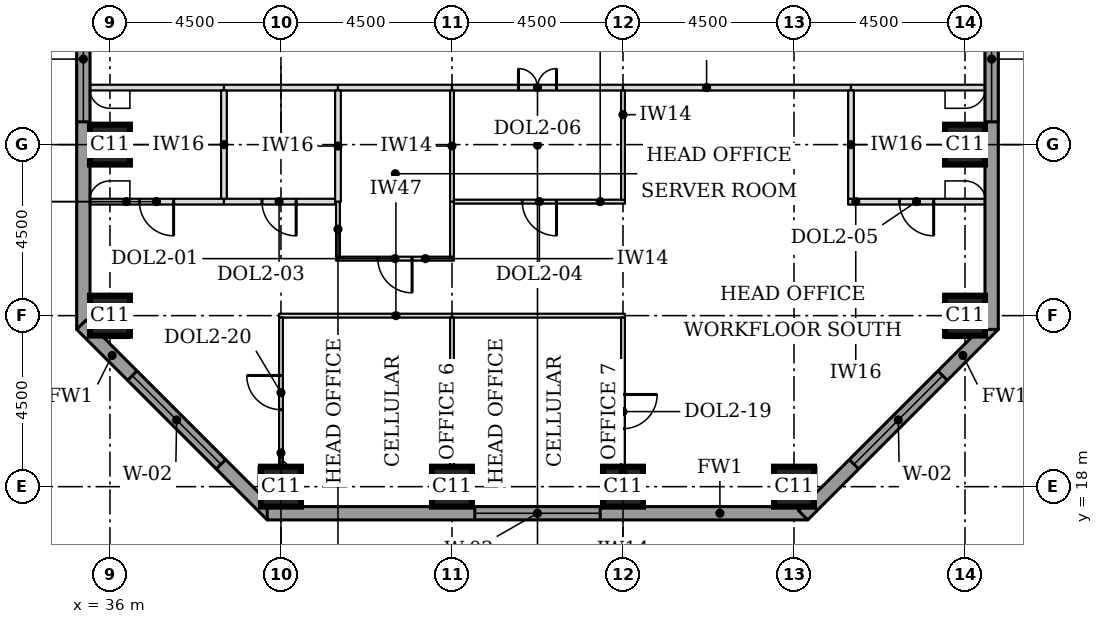
"""IFC4 building model, lengths in metres.
Left out: names, types, materials, properties, quantities, classifications, styles, units other than length and angle.
Written with IfcOpenShell. Run it as: python <this file> out.ifc"""

import sys

from ifc_helpers import new_model, si_unit, direction, frame, frame_2d, origin, origin_2d, place, context, subcontext, project, spatial, rectangle, extrude, element, fill, save


model = new_model("IFC4")
c1 = context("Model", 3, precision=1e-05, world=origin(), true_north=direction((0.0, 1.0)))
c2 = subcontext(c1, "Body", "Model", "MODEL_VIEW")
j1 = project(units=[si_unit("LENGTHUNIT", "METRE"), si_unit("PLANEANGLEUNIT", "RADIAN")], contexts=[c1])
p1 = place(None, origin())
s1 = spatial("IfcSite", under=j1, at=p1, CompositionType="ELEMENT")
p2 = place(p1, origin())
s2 = spatial("IfcBuilding", under=s1, at=p2, CompositionType="ELEMENT")
p3 = place(p2, frame((0.0, 0.0, 86.3)))
s3 = spatial("IfcBuildingStorey", under=s2, at=p3, CompositionType="ELEMENT", Elevation=86.3)
for number, where, z_axis, x_axis in (
    (1, (40.5, 18.0, 0.0), (0.0, 0.0, 1.0), (1.0, 0.0, 0.0)),
    (2, (45.0, 18.0, 0.0), (0.0, 0.0, 1.0), (1.0, 0.0, 0.0)),
    (3, (49.5, 18.0, 0.0), (0.0, 0.0, 1.0), (1.0, 0.0, 0.0)),
    (4, (54.0, 18.0, 0.0), (0.0, 0.0, 1.0), (1.0, 0.0, 0.0)),
    (5, (36.0, 22.5, 0.0), (0.0, 0.0, 1.0), (1.0, 0.0, 0.0)),
    (6, (58.5, 22.5, 0.0), (0.0, 0.0, 1.0), (1.0, 0.0, 0.0)),
    (7, (36.0, 27.0, 0.0), (0.0, 0.0, 1.0), (1.0, 0.0, 0.0)),
    (8, (58.5, 27.0, 0.0), (0.0, 0.0, 1.0), (1.0, 0.0, 0.0)),
):
    element("IfcColumn", number, at=place(p3, frame(where, z_axis=z_axis, x_axis=x_axis)), inside=s3, PredefinedType="COLUMN", context=c2, shape_type="SweptSolid", body=[
        extrude(rectangle(XDim=1.05, YDim=1.05, at=origin_2d()), origin(), (0.0, 0.0, 1.0), 3.7),
    ])
p4 = place(p3, frame((35.3, 39.975, 0.0), z_axis=(0.0, 0.0, 1.0), x_axis=(0.0, -1.0, 0.0)))
e9 = element("IfcWall", 9, at=p4, inside=s3, PredefinedType="STANDARD", context=c2, shape_type="SweptSolid", body=[
    extrude(rectangle(XDim=17.837, YDim=0.35, at=frame_2d((8.919, 0.0))), origin(), (0.0, 0.0, 1.0), 3.525),
])
p5 = place(p4, frame((0.5, 0.0, 0.9)))
e10 = element("IfcOpeningElement", 10, at=p5, cuts=e9, PredefinedType="OPENING", context=c2, shape_type="SweptSolid", body=[
    extrude(rectangle(XDim=3.3, YDim=1.9, at=frame_2d((1.65, 0.95))), frame((0.0, 0.185, 0.0), z_axis=(0.0, -1.0, 0.0), x_axis=(1.0, 0.0, 0.0)), (0.0, 0.0, 1.0), 0.37),
])
p6 = place(p4, frame((9.075, 0.0, 0.9)))
e11 = element("IfcOpeningElement", 11, at=p6, cuts=e9, PredefinedType="OPENING", context=c2, shape_type="SweptSolid", body=[
    extrude(rectangle(XDim=3.3, YDim=1.9, at=frame_2d((1.65, 0.95))), frame((0.0, 0.185, 0.0), z_axis=(0.0, -1.0, 0.0), x_axis=(1.0, 0.0, 0.0)), (0.0, 0.0, 1.0), 0.37),
])
p7 = place(p3, frame((35.249, 22.261, 0.0), z_axis=(0.0, 0.0, 1.0), x_axis=(0.707106781187, -0.707106781187, 0.0)))
e12 = element("IfcWall", 12, at=p7, inside=s3, PredefinedType="STANDARD", context=c2, shape_type="SweptSolid", body=[
    extrude(rectangle(XDim=7.089, YDim=0.35, at=frame_2d((3.544, 0.0))), origin(), (0.0, 0.0, 1.0), 3.525),
])
p8 = place(p7, frame((1.894, 0.0, 0.9)))
e13 = element("IfcOpeningElement", 13, at=p8, cuts=e12, PredefinedType="OPENING", context=c2, shape_type="SweptSolid", body=[
    extrude(rectangle(XDim=3.3, YDim=1.9, at=frame_2d((1.65, 0.95))), frame((0.0, 0.185, 0.0), z_axis=(0.0, -1.0, 0.0), x_axis=(1.0, 0.0, 0.0)), (0.0, 0.0, 1.0), 0.37),
])
p9 = place(p3, frame((40.138, 17.3, 0.0), z_axis=(0.0, 0.0, 1.0), x_axis=(1.0, 0.0, 0.0)))
e14 = element("IfcWall", 14, at=p9, inside=s3, PredefinedType="STANDARD", context=c2, shape_type="SweptSolid", body=[
    extrude(rectangle(XDim=14.225, YDim=0.35, at=frame_2d((7.112, 0.0))), origin(), (0.0, 0.0, 1.0), 3.525),
])
p10 = place(p9, frame((5.462, 0.0, 0.9)))
e15 = element("IfcOpeningElement", 15, at=p10, cuts=e14, PredefinedType="OPENING", context=c2, shape_type="SweptSolid", body=[
    extrude(rectangle(XDim=3.3, YDim=1.9, at=frame_2d((1.65, 0.95))), frame((0.0, 0.185, 0.0), z_axis=(0.0, -1.0, 0.0), x_axis=(1.0, 0.0, 0.0)), (0.0, 0.0, 1.0), 0.37),
])
p11 = place(p3, frame((54.239, 17.249, 0.0), z_axis=(0.0, 0.0, 1.0), x_axis=(0.707106781187, 0.707106781187, 0.0)))
e16 = element("IfcWall", 16, at=p11, inside=s3, PredefinedType="STANDARD", context=c2, shape_type="SweptSolid", body=[
    extrude(rectangle(XDim=7.089, YDim=0.35, at=frame_2d((3.544, 0.0))), origin(), (0.0, 0.0, 1.0), 3.525),
])
p12 = place(p11, frame((1.894, 0.0, 0.9)))
e17 = element("IfcOpeningElement", 17, at=p12, cuts=e16, PredefinedType="OPENING", context=c2, shape_type="SweptSolid", body=[
    extrude(rectangle(XDim=3.3, YDim=1.9, at=frame_2d((1.65, 0.95))), frame((0.0, 0.185, 0.0), z_axis=(0.0, -1.0, 0.0), x_axis=(1.0, 0.0, 0.0)), (0.0, 0.0, 1.0), 0.37),
])
p13 = place(p3, frame((59.2, 22.138, 0.0), z_axis=(0.0, 0.0, 1.0), x_axis=(0.0, 1.0, 0.0)))
e18 = element("IfcWall", 18, at=p13, inside=s3, PredefinedType="STANDARD", context=c2, shape_type="SweptSolid", body=[
    extrude(rectangle(XDim=17.837, YDim=0.35, at=frame_2d((8.919, 0.0))), origin(), (0.0, 0.0, 1.0), 3.525),
])
p14 = place(p13, frame((5.462, 0.0, 0.9)))
e19 = element("IfcOpeningElement", 19, at=p14, cuts=e18, PredefinedType="OPENING", context=c2, shape_type="SweptSolid", body=[
    extrude(rectangle(XDim=3.3, YDim=1.9, at=frame_2d((1.65, 0.95))), frame((0.0, 0.185, 0.0), z_axis=(0.0, -1.0, 0.0), x_axis=(1.0, 0.0, 0.0)), (0.0, 0.0, 1.0), 0.37),
])
p15 = place(p13, frame((14.037, 0.0, 0.9)))
e20 = element("IfcOpeningElement", 20, at=p15, cuts=e18, PredefinedType="OPENING", context=c2, shape_type="SweptSolid", body=[
    extrude(rectangle(XDim=3.3, YDim=1.9, at=frame_2d((1.65, 0.95))), frame((0.0, 0.185, 0.0), z_axis=(0.0, -1.0, 0.0), x_axis=(1.0, 0.0, 0.0)), (0.0, 0.0, 1.0), 0.37),
])
for number, where, z_axis, x_axis in (
    (21, (40.45, 22.5, 0.0), (0.0, 0.0, 1.0), (1.0, 0.0, 0.0)),
    (22, (45.0, 22.5, 0.0), (0.0, 0.0, 1.0), (1.0, 0.0, 0.0)),
):
    element("IfcWall", number, at=place(p3, frame(where, z_axis=z_axis, x_axis=x_axis)), inside=s3, PredefinedType="PARTITIONING", context=c2, shape_type="SweptSolid", body=[
        extrude(rectangle(XDim=4.55, YDim=0.1, at=frame_2d((2.275, 0.0))), origin(), (0.0, 0.0, 1.0), 2.55),
    ])
p16 = place(p3, frame((41.95, 24.0, 0.0), z_axis=(0.0, 0.0, 1.0), x_axis=(1.0, 0.0, 0.0)))
e23 = element("IfcWall", 23, at=p16, inside=s3, PredefinedType="PARTITIONING", context=c2, shape_type="SweptSolid", body=[
    extrude(rectangle(XDim=3.1, YDim=0.1, at=frame_2d((1.55, 0.0))), origin(), (0.0, 0.0, 1.0), 3.55),
])
p17 = place(p16, frame((1.1, 0.0, 0.0)))
e24 = element("IfcOpeningElement", 24, at=p17, cuts=e23, PredefinedType="OPENING", context=c2, shape_type="SweptSolid", body=[
    extrude(rectangle(XDim=0.9, YDim=2.1, at=frame_2d((0.45, 1.05))), frame((0.0, 0.06, 0.0), z_axis=(0.0, -1.0, 0.0), x_axis=(1.0, 0.0, 0.0)), (0.0, 0.0, 1.0), 0.12),
])
p18 = place(p3, frame((35.475, 25.5, 0.0), z_axis=(0.0, 0.0, 1.0), x_axis=(1.0, 0.0, 0.0)))
e25 = element("IfcWall", 25, at=p18, inside=s3, PredefinedType="PARTITIONING", context=c2, shape_type="SweptSolid", body=[
    extrude(rectangle(XDim=3.525, YDim=0.15, at=frame_2d((1.762, 0.0))), origin(), (0.0, 0.0, 1.0), 3.55),
])
p19 = place(p18, frame((1.3, 0.0, 0.0)))
e26 = element("IfcOpeningElement", 26, at=p19, cuts=e25, PredefinedType="OPENING", context=c2, shape_type="SweptSolid", body=[
    extrude(rectangle(XDim=0.9, YDim=2.1, at=frame_2d((0.45, 1.05))), frame((0.0, 0.085, 0.0), z_axis=(0.0, -1.0, 0.0), x_axis=(1.0, 0.0, 0.0)), (0.0, 0.0, 1.0), 0.17),
])
p20 = place(p3, frame((39.0, 25.5, 0.0), z_axis=(0.0, 0.0, 1.0), x_axis=(1.0, 0.0, 0.0)))
e27 = element("IfcWall", 27, at=p20, inside=s3, PredefinedType="PARTITIONING", context=c2, shape_type="SweptSolid", body=[
    extrude(rectangle(XDim=2.925, YDim=0.15, at=frame_2d((1.462, 0.0))), origin(), (0.0, 0.0, 1.0), 3.55),
])
p21 = place(p20, frame((1.0, 0.0, 0.0)))
e28 = element("IfcOpeningElement", 28, at=p21, cuts=e27, PredefinedType="OPENING", context=c2, shape_type="SweptSolid", body=[
    extrude(rectangle(XDim=0.9, YDim=2.1, at=frame_2d((0.45, 1.05))), frame((0.0, 0.085, 0.0), z_axis=(0.0, -1.0, 0.0), x_axis=(1.0, 0.0, 0.0)), (0.0, 0.0, 1.0), 0.17),
])
p22 = place(p3, frame((45.05, 25.5, 0.0), z_axis=(0.0, 0.0, 1.0), x_axis=(1.0, 0.0, 0.0)))
e29 = element("IfcWall", 29, at=p22, inside=s3, PredefinedType="PARTITIONING", context=c2, shape_type="SweptSolid", body=[
    extrude(rectangle(XDim=4.5, YDim=0.1, at=frame_2d((2.25, 0.0))), origin(), (0.0, 0.0, 1.0), 3.55),
])
p23 = place(p22, frame((1.8, 0.0, 0.0)))
e30 = element("IfcOpeningElement", 30, at=p23, cuts=e29, PredefinedType="OPENING", context=c2, shape_type="SweptSolid", body=[
    extrude(rectangle(XDim=0.9, YDim=2.1, at=frame_2d((0.45, 1.05))), frame((0.0, 0.06, 0.0), z_axis=(0.0, -1.0, 0.0), x_axis=(1.0, 0.0, 0.0)), (0.0, 0.0, 1.0), 0.12),
])
p24 = place(p3, frame((55.425, 25.5, 0.0), z_axis=(0.0, 0.0, 1.0), x_axis=(1.0, 0.0, 0.0)))
e31 = element("IfcWall", 31, at=p24, inside=s3, PredefinedType="PARTITIONING", context=c2, shape_type="SweptSolid", body=[
    extrude(rectangle(XDim=3.6, YDim=0.15, at=frame_2d((1.8, 0.0))), origin(), (0.0, 0.0, 1.0), 3.55),
])
p25 = place(p24, frame((1.35, 0.0, 0.0)))
e32 = element("IfcOpeningElement", 32, at=p25, cuts=e31, PredefinedType="OPENING", context=c2, shape_type="SweptSolid", body=[
    extrude(rectangle(XDim=0.9, YDim=2.1, at=frame_2d((0.45, 1.05))), frame((0.0, 0.085, 0.0), z_axis=(0.0, -1.0, 0.0), x_axis=(1.0, 0.0, 0.0)), (0.0, 0.0, 1.0), 0.17),
])
p26 = place(p3, frame((35.475, 28.5, 0.0), z_axis=(0.0, 0.0, 1.0), x_axis=(1.0, 0.0, 0.0)))
e33 = element("IfcWall", 33, at=p26, inside=s3, PredefinedType="PARTITIONING", context=c2, shape_type="SweptSolid", body=[
    extrude(rectangle(XDim=3.525, YDim=0.15, at=frame_2d((1.762, 0.0))), origin(), (0.0, 0.0, 1.0), 3.55),
])
for number, where, z_axis, x_axis in (
    (34, (39.0, 28.5, 0.0), (0.0, 0.0, 1.0), (1.0, 0.0, 0.0)),
    (35, (42.0, 28.5, 0.0), (0.0, 0.0, 1.0), (1.0, 0.0, 0.0)),
):
    element("IfcWall", number, at=place(p3, frame(where, z_axis=z_axis, x_axis=x_axis)), inside=s3, PredefinedType="PARTITIONING", context=c2, shape_type="SweptSolid", body=[
        extrude(rectangle(XDim=3.0, YDim=0.15, at=frame_2d((1.5, 0.0))), origin(), (0.0, 0.0, 1.0), 3.55),
    ])
p27 = place(p3, frame((45.0, 28.5, 0.0), z_axis=(0.0, 0.0, 1.0), x_axis=(1.0, 0.0, 0.0)))
e36 = element("IfcWall", 36, at=p27, inside=s3, PredefinedType="PARTITIONING", context=c2, shape_type="SweptSolid", body=[
    extrude(rectangle(XDim=4.5, YDim=0.15, at=frame_2d((2.25, 0.0))), origin(), (0.0, 0.0, 1.0), 3.55),
])
p28 = place(p27, frame((1.75, 0.0, 0.0)))
e37 = element("IfcOpeningElement", 37, at=p28, cuts=e36, PredefinedType="OPENING", context=c2, shape_type="SweptSolid", body=[
    extrude(rectangle(XDim=1.0, YDim=2.1, at=frame_2d((0.5, 1.05))), frame((0.0, 0.085, 0.0), z_axis=(0.0, -1.0, 0.0), x_axis=(1.0, 0.0, 0.0)), (0.0, 0.0, 1.0), 0.17),
])
p29 = place(p3, frame((49.5, 28.5, 0.0), z_axis=(0.0, 0.0, 1.0), x_axis=(1.0, 0.0, 0.0)))
e38 = element("IfcWall", 38, at=p29, inside=s3, PredefinedType="PARTITIONING", context=c2, shape_type="SweptSolid", body=[
    extrude(rectangle(XDim=6.0, YDim=0.15, at=frame_2d((3.0, 0.0))), origin(), (0.0, 0.0, 1.0), 3.55),
])
p30 = place(p3, frame((55.5, 28.5, 0.0), z_axis=(0.0, 0.0, 1.0), x_axis=(1.0, 0.0, 0.0)))
e39 = element("IfcWall", 39, at=p30, inside=s3, PredefinedType="PARTITIONING", context=c2, shape_type="SweptSolid", body=[
    extrude(rectangle(XDim=3.525, YDim=0.15, at=frame_2d((1.762, 0.0))), origin(), (0.0, 0.0, 1.0), 3.55),
])
p31 = place(p3, frame((45.0, 17.475, 0.0), z_axis=(0.0, 0.0, 1.0), x_axis=(0.0, 1.0, 0.0)))
e40 = element("IfcWall", 40, at=p31, inside=s3, PredefinedType="PARTITIONING", context=c2, shape_type="SweptSolid", body=[
    extrude(rectangle(XDim=4.975, YDim=0.1, at=frame_2d((2.487, 0.0))), origin(), (0.0, 0.0, 1.0), 3.55),
])
p32 = place(p3, frame((49.5, 17.475, 0.0), z_axis=(0.0, 0.0, 1.0), x_axis=(0.0, 1.0, 0.0)))
e41 = element("IfcWall", 41, at=p32, inside=s3, PredefinedType="PARTITIONING", context=c2, shape_type="SweptSolid", body=[
    extrude(rectangle(XDim=4.975, YDim=0.1, at=frame_2d((2.487, 0.0))), origin(), (0.0, 0.0, 1.0), 3.55),
])
p33 = place(p32, frame((2.05, 0.0, 0.0)))
e42 = element("IfcOpeningElement", 42, at=p33, cuts=e41, PredefinedType="OPENING", context=c2, shape_type="SweptSolid", body=[
    extrude(rectangle(XDim=0.9, YDim=2.1, at=frame_2d((0.45, 1.05))), frame((0.0, 0.06, 0.0), z_axis=(0.0, -1.0, 0.0), x_axis=(1.0, 0.0, 0.0)), (0.0, 0.0, 1.0), 0.12),
])
p34 = place(p3, frame((40.5, 18.525, 0.0), z_axis=(0.0, 0.0, 1.0), x_axis=(0.0, 1.0, 0.0)))
e43 = element("IfcWall", 43, at=p34, inside=s3, PredefinedType="PARTITIONING", context=c2, shape_type="SweptSolid", body=[
    extrude(rectangle(XDim=3.925, YDim=0.1, at=frame_2d((1.962, 0.0))), origin(), (0.0, 0.0, 1.0), 3.55),
])
p35 = place(p34, frame((1.5, 0.0, 0.0)))
e44 = element("IfcOpeningElement", 44, at=p35, cuts=e43, PredefinedType="OPENING", context=c2, shape_type="SweptSolid", body=[
    extrude(rectangle(XDim=0.9, YDim=2.1, at=frame_2d((0.45, 1.05))), frame((0.0, 0.06, 0.0), z_axis=(0.0, -1.0, 0.0), x_axis=(1.0, 0.0, 0.0)), (0.0, 0.0, 1.0), 0.12),
])
for number, where, z_axis, x_axis in (
    (45, (42.0, 24.05, 0.0), (0.0, 0.0, 1.0), (0.0, 1.0, 0.0)),
    (46, (45.0, 24.05, 0.0), (0.0, 0.0, 1.0), (0.0, 1.0, 0.0)),
):
    element("IfcWall", number, at=place(p3, frame(where, z_axis=z_axis, x_axis=x_axis)), inside=s3, PredefinedType="PARTITIONING", context=c2, shape_type="SweptSolid", body=[
        extrude(rectangle(XDim=1.45, YDim=0.1, at=frame_2d((0.725, 0.0))), origin(), (0.0, 0.0, 1.0), 3.55),
    ])
p36 = place(p3, frame((42.0, 25.5, 0.0), z_axis=(0.0, 0.0, 1.0), x_axis=(0.0, 1.0, 0.0)))
e47 = element("IfcWall", 47, at=p36, inside=s3, PredefinedType="PARTITIONING", context=c2, shape_type="SweptSolid", body=[
    extrude(rectangle(XDim=2.925, YDim=0.15, at=frame_2d((1.462, 0.0))), origin(), (0.0, 0.0, 1.0), 3.55),
])
p37 = place(p3, frame((45.0, 25.5, 0.0), z_axis=(0.0, 0.0, 1.0), x_axis=(0.0, 1.0, 0.0)))
e48 = element("IfcWall", 48, at=p37, inside=s3, PredefinedType="PARTITIONING", context=c2, shape_type="SweptSolid", body=[
    extrude(rectangle(XDim=2.925, YDim=0.1, at=frame_2d((1.462, 0.0))), origin(), (0.0, 0.0, 1.0), 3.55),
])
p38 = place(p3, frame((49.5, 25.55, 0.0), z_axis=(0.0, 0.0, 1.0), x_axis=(0.0, 1.0, 0.0)))
e49 = element("IfcWall", 49, at=p38, inside=s3, PredefinedType="PARTITIONING", context=c2, shape_type="SweptSolid", body=[
    extrude(rectangle(XDim=2.875, YDim=0.1, at=frame_2d((1.438, 0.0))), origin(), (0.0, 0.0, 1.0), 3.55),
])
for number, where, z_axis, x_axis in (
    (50, (39.0, 25.575, 0.0), (0.0, 0.0, 1.0), (0.0, 1.0, 0.0)),
    (51, (55.5, 25.575, 0.0), (0.0, 0.0, 1.0), (0.0, 1.0, 0.0)),
):
    element("IfcWall", number, at=place(p3, frame(where, z_axis=z_axis, x_axis=x_axis)), inside=s3, PredefinedType="PARTITIONING", context=c2, shape_type="SweptSolid", body=[
        extrude(rectangle(XDim=2.85, YDim=0.15, at=frame_2d((1.425, 0.0))), origin(), (0.0, 0.0, 1.0), 3.55),
    ])
p39 = place(p6, origin())
e52 = element("IfcWindow", 52, at=p39, inside=s3, PartitioningType="SINGLE_PANEL", PredefinedType="WINDOW", context=c2, shape_type="SweptSolid", body=[
    extrude(rectangle(XDim=3.3, YDim=1.9, at=frame_2d((1.65, 0.95))), frame((0.0, 0.085, 0.0), z_axis=(0.0, -1.0, 0.0), x_axis=(1.0, 0.0, 0.0)), (0.0, 0.0, 1.0), 0.06),
])
fill(e11, e52)
p40 = place(p8, origin())
e53 = element("IfcWindow", 53, at=p40, inside=s3, PartitioningType="SINGLE_PANEL", PredefinedType="WINDOW", context=c2, shape_type="SweptSolid", body=[
    extrude(rectangle(XDim=3.3, YDim=1.9, at=frame_2d((1.65, 0.95))), frame((0.0, 0.085, 0.0), z_axis=(0.0, -1.0, 0.0), x_axis=(1.0, 0.0, 0.0)), (0.0, 0.0, 1.0), 0.06),
])
fill(e13, e53)
p41 = place(p10, origin())
e54 = element("IfcWindow", 54, at=p41, inside=s3, PartitioningType="SINGLE_PANEL", PredefinedType="WINDOW", context=c2, shape_type="SweptSolid", body=[
    extrude(rectangle(XDim=3.3, YDim=1.9, at=frame_2d((1.65, 0.95))), frame((0.0, 0.085, 0.0), z_axis=(0.0, -1.0, 0.0), x_axis=(1.0, 0.0, 0.0)), (0.0, 0.0, 1.0), 0.06),
])
fill(e15, e54)
p42 = place(p12, origin())
e55 = element("IfcWindow", 55, at=p42, inside=s3, PartitioningType="SINGLE_PANEL", PredefinedType="WINDOW", context=c2, shape_type="SweptSolid", body=[
    extrude(rectangle(XDim=3.3, YDim=1.9, at=frame_2d((1.65, 0.95))), frame((0.0, 0.085, 0.0), z_axis=(0.0, -1.0, 0.0), x_axis=(1.0, 0.0, 0.0)), (0.0, 0.0, 1.0), 0.06),
])
fill(e17, e55)
p43 = place(p14, origin())
e56 = element("IfcWindow", 56, at=p43, inside=s3, PartitioningType="SINGLE_PANEL", PredefinedType="WINDOW", context=c2, shape_type="SweptSolid", body=[
    extrude(rectangle(XDim=3.3, YDim=1.9, at=frame_2d((1.65, 0.95))), frame((0.0, 0.085, 0.0), z_axis=(0.0, -1.0, 0.0), x_axis=(1.0, 0.0, 0.0)), (0.0, 0.0, 1.0), 0.06),
])
fill(e19, e56)
p44 = place(p28, origin())
e57 = element("IfcDoor", 57, at=p44, inside=s3, OperationType="DOUBLE_DOOR_SINGLE_SWING", PredefinedType="DOOR", context=c2, shape_type="SweptSolid", body=[
    extrude(rectangle(XDim=1.0, YDim=2.1, at=frame_2d((0.5, 1.05))), frame((0.0, 0.025, 0.0), z_axis=(0.0, -1.0, 0.0), x_axis=(1.0, 0.0, 0.0)), (0.0, 0.0, 1.0), 0.05),
])
fill(e37, e57)
p45 = place(p23, frame((0.9, 0.0, 0.0), z_axis=(0.0, 0.0, 1.0), x_axis=(-1.0, 0.0, 0.0)))
e58 = element("IfcDoor", 58, at=p45, inside=s3, OperationType="SINGLE_SWING_LEFT", PredefinedType="DOOR", context=c2, shape_type="SweptSolid", body=[
    extrude(rectangle(XDim=0.9, YDim=2.1, at=frame_2d((0.45, 1.05))), frame((0.0, 0.025, 0.0), z_axis=(0.0, -1.0, 0.0), x_axis=(1.0, 0.0, 0.0)), (0.0, 0.0, 1.0), 0.05),
])
fill(e30, e58)
p46 = place(p21, frame((0.9, 0.0, 0.0), z_axis=(0.0, 0.0, 1.0), x_axis=(-1.0, 0.0, 0.0)))
e59 = element("IfcDoor", 59, at=p46, inside=s3, OperationType="SINGLE_SWING_LEFT", PredefinedType="DOOR", context=c2, shape_type="SweptSolid", body=[
    extrude(rectangle(XDim=0.9, YDim=2.1, at=frame_2d((0.45, 1.05))), frame((0.0, 0.025, 0.0), z_axis=(0.0, -1.0, 0.0), x_axis=(1.0, 0.0, 0.0)), (0.0, 0.0, 1.0), 0.05),
])
fill(e28, e59)
p47 = place(p35, origin())
e60 = element("IfcDoor", 60, at=p47, inside=s3, OperationType="SINGLE_SWING_RIGHT", PredefinedType="DOOR", context=c2, shape_type="SweptSolid", body=[
    extrude(rectangle(XDim=0.9, YDim=2.1, at=frame_2d((0.45, 1.05))), frame((0.0, 0.025, 0.0), z_axis=(0.0, -1.0, 0.0), x_axis=(1.0, 0.0, 0.0)), (0.0, 0.0, 1.0), 0.05),
])
fill(e44, e60)
p48 = place(p33, frame((0.9, 0.0, 0.0), z_axis=(0.0, 0.0, 1.0), x_axis=(-1.0, 0.0, 0.0)))
e61 = element("IfcDoor", 61, at=p48, inside=s3, OperationType="SINGLE_SWING_LEFT", PredefinedType="DOOR", context=c2, shape_type="SweptSolid", body=[
    extrude(rectangle(XDim=0.9, YDim=2.1, at=frame_2d((0.45, 1.05))), frame((0.0, 0.025, 0.0), z_axis=(0.0, -1.0, 0.0), x_axis=(1.0, 0.0, 0.0)), (0.0, 0.0, 1.0), 0.05),
])
fill(e42, e61)
p49 = place(p25, frame((0.9, 0.0, 0.0), z_axis=(0.0, 0.0, 1.0), x_axis=(-1.0, 0.0, 0.0)))
e62 = element("IfcDoor", 62, at=p49, inside=s3, OperationType="SINGLE_SWING_LEFT", PredefinedType="DOOR", context=c2, shape_type="SweptSolid", body=[
    extrude(rectangle(XDim=0.9, YDim=2.1, at=frame_2d((0.45, 1.05))), frame((0.0, 0.025, 0.0), z_axis=(0.0, -1.0, 0.0), x_axis=(1.0, 0.0, 0.0)), (0.0, 0.0, 1.0), 0.05),
])
fill(e32, e62)
p50 = place(p17, frame((0.9, 0.0, 0.0), z_axis=(0.0, 0.0, 1.0), x_axis=(-1.0, 0.0, 0.0)))
e63 = element("IfcDoor", 63, at=p50, inside=s3, OperationType="SINGLE_SWING_LEFT", PredefinedType="DOOR", context=c2, shape_type="SweptSolid", body=[
    extrude(rectangle(XDim=0.9, YDim=2.1, at=frame_2d((0.45, 1.05))), frame((0.0, 0.025, 0.0), z_axis=(0.0, -1.0, 0.0), x_axis=(1.0, 0.0, 0.0)), (0.0, 0.0, 1.0), 0.05),
])
fill(e24, e63)
p51 = place(p19, frame((0.9, 0.0, 0.0), z_axis=(0.0, 0.0, 1.0), x_axis=(-1.0, 0.0, 0.0)))
e64 = element("IfcDoor", 64, at=p51, inside=s3, OperationType="SINGLE_SWING_LEFT", PredefinedType="DOOR", context=c2, shape_type="SweptSolid", body=[
    extrude(rectangle(XDim=0.9, YDim=2.1, at=frame_2d((0.45, 1.05))), frame((0.0, 0.025, 0.0), z_axis=(0.0, -1.0, 0.0), x_axis=(1.0, 0.0, 0.0)), (0.0, 0.0, 1.0), 0.05),
])
fill(e26, e64)
save(model, sys.argv[1])
